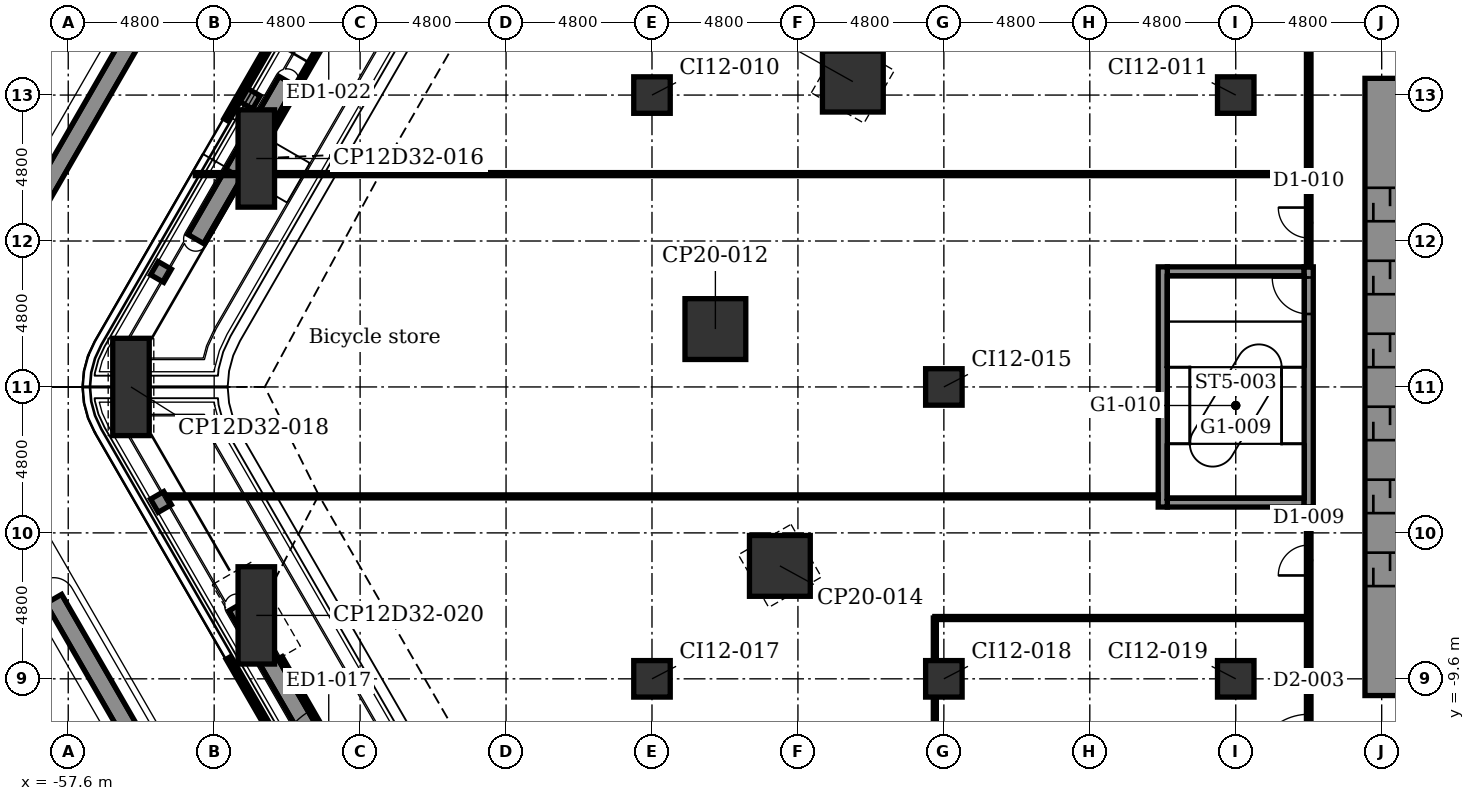
"""IFC4 building model, lengths in metres.
Left out: names, types, materials, properties, quantities, classifications, styles, units other than length and angle.
Written with IfcOpenShell. Run it as: python <this file> out.ifc"""

import sys

from ifc_helpers import new_model, si_unit, direction, frame, frame_2d, origin, origin_2d, place, context, subcontext, project, spatial, rectangle, extrude, element, fill, save


model = new_model("IFC4")
c1 = context("Model", 3, precision=1e-05, world=origin(), true_north=direction((0.0, 1.0)))
c2 = subcontext(c1, "Body", "Model", "MODEL_VIEW")
j1 = project(units=[si_unit("LENGTHUNIT", "METRE"), si_unit("PLANEANGLEUNIT", "RADIAN")], contexts=[c1])
p1 = place(None, origin())
s1 = spatial("IfcSite", under=j1, at=p1, CompositionType="ELEMENT")
p2 = place(p1, origin())
s2 = spatial("IfcBuilding", under=s1, at=p2, CompositionType="ELEMENT")
p3 = place(p2, origin())
s3 = spatial("IfcBuildingStorey", under=s2, at=p3, CompositionType="ELEMENT", Elevation=0.0)
for number, where, z_axis, x_axis in (
    (1, (-51.414, -7.514, -0.4), (0.0, 0.0, 1.0), (0.866, 0.5, 0.0)),
    (2, (-55.536, 0.0, -0.4), (0.0, 0.0, 1.0), (1.0, 0.0, 0.0)),
    (3, (-51.414, 7.514, -0.4), (0.0, 0.0, 1.0), (0.5, 0.866, 0.0)),
):
    element("IfcColumn", number, at=place(p3, frame(where, z_axis=z_axis, x_axis=x_axis)), inside=s3, PredefinedType="COLUMN", context=c2, shape_type="SweptSolid", body=[
        extrude(rectangle(XDim=1.2, YDim=3.2, at=origin_2d()), origin(), (0.0, 0.0, 1.0), 7.1),
    ])
for number, where, z_axis, x_axis in (
    (4, (-34.194, -5.885, -0.4), (0.0, 0.0, 1.0), (0.866, 0.5, 0.0)),
    (5, (-36.315, 1.904, -0.4), (0.0, 0.0, 1.0), (1.0, 0.0, 0.0)),
    (6, (-31.794, 10.042, -0.4), (0.0, 0.0, 1.0), (0.5, 0.866, 0.0)),
):
    element("IfcColumn", number, at=place(p3, frame(where, z_axis=z_axis, x_axis=x_axis)), inside=s3, PredefinedType="COLUMN", context=c2, shape_type="SweptSolid", body=[
        extrude(rectangle(XDim=2.0, YDim=2.0, at=origin_2d()), origin(), (0.0, 0.0, 1.0), 7.1),
    ])
for number, where, z_axis, x_axis in (
    (7, (-38.4, -9.6, -0.4), (0.0, 0.0, 1.0), (1.0, 0.0, 0.0)),
    (8, (-38.4, 9.6, -0.4), (0.0, 0.0, 1.0), (1.0, 0.0, 0.0)),
    (9, (-28.8, -9.6, -0.4), (0.0, 0.0, 1.0), (1.0, 0.0, 0.0)),
    (10, (-28.8, 0.0, -0.4), (0.0, 0.0, 1.0), (1.0, 0.0, 0.0)),
    (11, (-19.2, -9.6, -0.4), (0.0, 0.0, 1.0), (1.0, 0.0, 0.0)),
    (12, (-19.2, 9.6, -0.4), (0.0, 0.0, 1.0), (1.0, 0.0, 0.0)),
):
    element("IfcColumn", number, at=place(p3, frame(where, z_axis=z_axis, x_axis=x_axis)), inside=s3, PredefinedType="COLUMN", context=c2, shape_type="SweptSolid", body=[
        extrude(rectangle(XDim=1.2, YDim=1.2, at=origin_2d()), origin(), (0.0, 0.0, 1.0), 7.1),
    ])
for number, where, z_axis, x_axis in (
    (13, (-21.45, -3.8, -0.4), (0.0, 0.0, 1.0), (1.0, 0.0, 0.0)),
    (14, (-21.45, 3.8, -0.4), (0.0, 0.0, 1.0), (1.0, 0.0, 0.0)),
):
    element("IfcWall", number, at=place(p3, frame(where, z_axis=z_axis, x_axis=x_axis)), inside=s3, PredefinedType="STANDARD", context=c2, shape_type="SweptSolid", body=[
        extrude(rectangle(XDim=4.5, YDim=0.3, at=frame_2d((2.25, 0.0))), origin(), (0.0, 0.0, 1.0), 7.1),
    ])
p4 = place(p3, frame((-21.6, -3.95, -0.4), z_axis=(0.0, 0.0, 1.0), x_axis=(0.0, 1.0, 0.0)))
e15 = element("IfcWall", 15, at=p4, inside=s3, PredefinedType="STANDARD", context=c2, shape_type="SweptSolid", body=[
    extrude(rectangle(XDim=7.9, YDim=0.3, at=frame_2d((3.95, 0.0))), origin(), (0.0, 0.0, 1.0), 7.1),
])
p5 = place(p3, frame((-16.8, -3.95, -0.4), z_axis=(0.0, 0.0, 1.0), x_axis=(0.0, 1.0, 0.0)))
e16 = element("IfcWall", 16, at=p5, inside=s3, PredefinedType="STANDARD", context=c2, shape_type="SweptSolid", body=[
    extrude(rectangle(XDim=7.9, YDim=0.3, at=frame_2d((3.95, 0.0))), origin(), (0.0, 0.0, 1.0), 7.1),
])
p6 = place(p5, frame((6.35, 0.0, 0.4)))
e17 = element("IfcOpeningElement", 17, at=p6, cuts=e16, PredefinedType="OPENING", context=c2, shape_type="SweptSolid", body=[
    extrude(rectangle(XDim=1.2, YDim=2.1, at=frame_2d((0.6, 1.05))), frame((0.0, 0.16, 0.0), z_axis=(0.0, -1.0, 0.0), x_axis=(1.0, 0.0, 0.0)), (0.0, 0.0, 1.0), 0.32),
])
p7 = place(p3, frame((-14.4, -10.15, -0.4), z_axis=(0.0, 0.0, 1.0), x_axis=(0.0, 1.0, 0.0)))
e18 = element("IfcWall", 18, at=p7, inside=s3, PredefinedType="SHEAR", context=c2, shape_type="SweptSolid", body=[
    extrude(rectangle(XDim=20.3, YDim=1.1, at=frame_2d((10.15, 0.0))), origin(), (0.0, 0.0, 1.0), 7.1),
])
p8 = place(p7, frame((3.6, 0.0, 0.4)))
e19 = element("IfcOpeningElement", 19, at=p8, cuts=e18, PredefinedType="OPENING", context=c2, shape_type="SweptSolid", body=[
    extrude(rectangle(XDim=1.1, YDim=2.1, at=frame_2d((0.55, 1.05))), frame((0.0, 0.56, 0.0), z_axis=(0.0, -1.0, 0.0), x_axis=(1.0, 0.0, 0.0)), (0.0, 0.0, 1.0), 1.12),
])
p9 = place(p7, frame((6.0, 0.0, 0.4)))
e20 = element("IfcOpeningElement", 20, at=p9, cuts=e18, PredefinedType="OPENING", context=c2, shape_type="SweptSolid", body=[
    extrude(rectangle(XDim=1.1, YDim=2.1, at=frame_2d((0.55, 1.05))), frame((0.0, 0.56, 0.0), z_axis=(0.0, -1.0, 0.0), x_axis=(1.0, 0.0, 0.0)), (0.0, 0.0, 1.0), 1.12),
])
p10 = place(p7, frame((8.4, 0.0, 0.4)))
e21 = element("IfcOpeningElement", 21, at=p10, cuts=e18, PredefinedType="OPENING", context=c2, shape_type="SweptSolid", body=[
    extrude(rectangle(XDim=1.1, YDim=2.1, at=frame_2d((0.55, 1.05))), frame((0.0, 0.56, 0.0), z_axis=(0.0, -1.0, 0.0), x_axis=(1.0, 0.0, 0.0)), (0.0, 0.0, 1.0), 1.12),
])
p11 = place(p7, frame((10.8, 0.0, 0.4)))
e22 = element("IfcOpeningElement", 22, at=p11, cuts=e18, PredefinedType="OPENING", context=c2, shape_type="SweptSolid", body=[
    extrude(rectangle(XDim=1.1, YDim=2.1, at=frame_2d((0.55, 1.05))), frame((0.0, 0.56, 0.0), z_axis=(0.0, -1.0, 0.0), x_axis=(1.0, 0.0, 0.0)), (0.0, 0.0, 1.0), 1.12),
])
p12 = place(p7, frame((13.2, 0.0, 0.4)))
e23 = element("IfcOpeningElement", 23, at=p12, cuts=e18, PredefinedType="OPENING", context=c2, shape_type="SweptSolid", body=[
    extrude(rectangle(XDim=1.1, YDim=2.1, at=frame_2d((0.55, 1.05))), frame((0.0, 0.56, 0.0), z_axis=(0.0, -1.0, 0.0), x_axis=(1.0, 0.0, 0.0)), (0.0, 0.0, 1.0), 1.12),
])
p13 = place(p7, frame((15.6, 0.0, 0.4)))
e24 = element("IfcOpeningElement", 24, at=p13, cuts=e18, PredefinedType="OPENING", context=c2, shape_type="SweptSolid", body=[
    extrude(rectangle(XDim=1.1, YDim=2.1, at=frame_2d((0.55, 1.05))), frame((0.0, 0.56, 0.0), z_axis=(0.0, -1.0, 0.0), x_axis=(1.0, 0.0, 0.0)), (0.0, 0.0, 1.0), 1.12),
])
p14 = place(p3, frame((-47.433, -14.45, 0.0), z_axis=(0.0, 0.0, 1.0), x_axis=(-0.500002207027, 0.866024129553, 0.0)))
e25 = element("IfcWall", 25, at=p14, inside=s3, PredefinedType="PARTITIONING", context=c2, shape_type="SweptSolid", body=[
    extrude(rectangle(XDim=6.396, YDim=0.16, at=frame_2d((3.198, 0.0))), origin(), (0.0, 0.0, 1.0), 6.7),
])
p15 = place(p14, frame((1.998, 0.0, 0.0)))
e26 = element("IfcOpeningElement", 26, at=p15, cuts=e25, PredefinedType="OPENING", context=c2, shape_type="SweptSolid", body=[
    extrude(rectangle(XDim=2.4, YDim=2.4, at=frame_2d((1.2, 1.2))), frame((0.0, 0.09, 0.0), z_axis=(0.0, -1.0, 0.0), x_axis=(1.0, 0.0, 0.0)), (0.0, 0.0, 1.0), 0.18),
])
p16 = place(p3, frame((-51.131, 8.045, 0.0), z_axis=(0.0, 0.0, 1.0), x_axis=(0.49999513524, 0.866028212437, 0.0)))
e27 = element("IfcWall", 27, at=p16, inside=s3, PredefinedType="PARTITIONING", context=c2, shape_type="SweptSolid", body=[
    extrude(rectangle(XDim=8.396, YDim=0.16, at=frame_2d((4.198, 0.0))), origin(), (0.0, 0.0, 1.0), 6.7),
])
p17 = place(p16, frame((2.998, 0.0, 0.0)))
e28 = element("IfcOpeningElement", 28, at=p17, cuts=e27, PredefinedType="OPENING", context=c2, shape_type="SweptSolid", body=[
    extrude(rectangle(XDim=2.4, YDim=2.4, at=frame_2d((1.2, 1.2))), frame((0.0, 0.09, 0.0), z_axis=(0.0, -1.0, 0.0), x_axis=(1.0, 0.0, 0.0)), (0.0, 0.0, 1.0), 0.18),
])
p18 = place(p3, frame((-48.289, -15.927, 0.0), z_axis=(0.0, 0.0, 1.0), x_axis=(-0.500001755459, 0.866024390267, 0.0)))
e29 = element("IfcWall", 29, at=p18, inside=s3, PredefinedType="PARTITIONING", context=c2, shape_type="SweptSolid", body=[
    extrude(rectangle(XDim=8.096, YDim=0.16, at=frame_2d((4.048, 0.0))), origin(), (0.0, 0.0, 1.0), 6.7),
])
p19 = place(p18, frame((2.848, 0.0, 0.0)))
e30 = element("IfcOpeningElement", 30, at=p19, cuts=e29, PredefinedType="OPENING", context=c2, shape_type="SweptSolid", body=[
    extrude(rectangle(XDim=2.4, YDim=2.4, at=frame_2d((1.2, 1.2))), frame((0.0, 0.09, 0.0), z_axis=(0.0, -1.0, 0.0), x_axis=(1.0, 0.0, 0.0)), (0.0, 0.0, 1.0), 0.18),
])
p20 = place(p3, frame((-52.411, 8.787, 0.0), z_axis=(0.0, 0.0, 1.0), x_axis=(0.499996941814, 0.866027169422, 0.0)))
e31 = element("IfcWall", 31, at=p20, inside=s3, PredefinedType="PARTITIONING", context=c2, shape_type="SweptSolid", body=[
    extrude(rectangle(XDim=8.392, YDim=0.16, at=frame_2d((4.196, 0.0))), origin(), (0.0, 0.0, 1.0), 6.7),
])
p21 = place(p20, frame((2.996, 0.0, 0.0)))
e32 = element("IfcOpeningElement", 32, at=p21, cuts=e31, PredefinedType="OPENING", context=c2, shape_type="SweptSolid", body=[
    extrude(rectangle(XDim=2.4, YDim=2.4, at=frame_2d((1.2, 1.2))), frame((0.0, 0.09, 0.0), z_axis=(0.0, -1.0, 0.0), x_axis=(1.0, 0.0, 0.0)), (0.0, 0.0, 1.0), 0.18),
])
for number, where, z_axis, x_axis in (
    (33, (-49.052, -12.406, 7.0), (0.0, 0.0, 1.0), (-0.5, 0.866, 0.0)),
    (34, (-53.405, 4.865, 7.0), (0.0, 0.0, 1.0), (0.5, 0.866, 0.0)),
):
    element("IfcWall", number, at=place(p3, frame(where, z_axis=z_axis, x_axis=x_axis)), inside=s3, PredefinedType="USERDEFINED", context=c2, shape_type="SweptSolid", body=[
        extrude(rectangle(XDim=6.0, YDim=0.6, at=frame_2d((3.0, 0.0))), origin(), (0.0, 0.0, 1.0), 0.7),
    ])
for number, where, z_axis, x_axis in (
    (35, (-52.077, -17.365, 0.0), (0.0, 0.0, 1.0), (-0.5, 0.866, 0.0)),
    (36, (-60.577, 2.643, 0.0), (0.0, 0.0, 1.0), (0.5, 0.866, 0.0)),
):
    element("IfcWall", number, at=place(p3, frame(where, z_axis=z_axis, x_axis=x_axis)), inside=s3, PredefinedType="USERDEFINED", context=c2, shape_type="SweptSolid", body=[
        extrude(rectangle(XDim=12.0, YDim=0.6, at=frame_2d((6.0, 0.0))), origin(), (0.0, 0.0, 1.0), 0.7),
    ])
for number, where, z_axis, x_axis in (
    (37, (-54.425, -3.999, 0.0), (0.0, 0.0, 1.0), (-0.5, 0.866, 0.0)),
    (38, (-54.675, 3.565, 0.0), (0.0, 0.0, 1.0), (0.5, 0.866, 0.0)),
):
    element("IfcWall", number, at=place(p3, frame(where, z_axis=z_axis, x_axis=x_axis)), inside=s3, PredefinedType="SOLIDWALL", context=c2, shape_type="SweptSolid", body=[
        extrude(rectangle(XDim=0.5, YDim=0.5, at=frame_2d((0.25, 0.0))), origin(), (0.0, 0.0, 1.0), 6.4),
    ])
p22 = place(p3, frame((-51.753, 9.268, 0.0), z_axis=(0.0, 0.0, 1.0), x_axis=(0.500131122175, 0.865949687125, 0.0)))
e39 = element("IfcWall", 39, at=p22, inside=s3, PredefinedType="SOLIDWALL", context=c2, shape_type="SweptSolid", body=[
    extrude(rectangle(XDim=0.5, YDim=0.5, at=frame_2d((0.25, 0.0))), origin(), (0.0, 0.0, 1.0), 6.4),
])
p23 = place(p3, frame((-16.8, -14.8, 0.0), z_axis=(0.0, 0.0, 1.0), x_axis=(0.0, 1.0, 0.0)))
e40 = element("IfcWall", 40, at=p23, inside=s3, PredefinedType="PARTITIONING", context=c2, shape_type="SweptSolid", body=[
    extrude(rectangle(XDim=10.85, YDim=0.15, at=frame_2d((5.425, 0.0))), origin(), (0.0, 0.0, 1.0), 6.7),
])
p24 = place(p23, frame((2.235, 0.0, 0.0)))
e41 = element("IfcOpeningElement", 41, at=p24, cuts=e40, PredefinedType="OPENING", context=c2, shape_type="SweptSolid", body=[
    extrude(rectangle(XDim=1.8, YDim=2.1, at=frame_2d((0.9, 1.05))), frame((0.0, 0.085, 0.0), z_axis=(0.0, -1.0, 0.0), x_axis=(1.0, 0.0, 0.0)), (0.0, 0.0, 1.0), 0.17),
])
p25 = place(p23, frame((8.6, 0.0, 0.0)))
e42 = element("IfcOpeningElement", 42, at=p25, cuts=e40, PredefinedType="OPENING", context=c2, shape_type="SweptSolid", body=[
    extrude(rectangle(XDim=1.0, YDim=2.1, at=frame_2d((0.5, 1.05))), frame((0.0, 0.085, 0.0), z_axis=(0.0, -1.0, 0.0), x_axis=(1.0, 0.0, 0.0)), (0.0, 0.0, 1.0), 0.17),
])
p26 = place(p3, frame((-16.8, 3.95, 0.0), z_axis=(0.0, 0.0, 1.0), x_axis=(0.0, 1.0, 0.0)))
e43 = element("IfcWall", 43, at=p26, inside=s3, PredefinedType="PARTITIONING", context=c2, shape_type="SweptSolid", body=[
    extrude(rectangle(XDim=12.05, YDim=0.15, at=frame_2d((6.025, 0.0))), origin(), (0.0, 0.0, 1.0), 6.7),
])
p27 = place(p26, frame((0.95, 0.0, 0.0)))
e44 = element("IfcOpeningElement", 44, at=p27, cuts=e43, PredefinedType="OPENING", context=c2, shape_type="SweptSolid", body=[
    extrude(rectangle(XDim=1.0, YDim=2.1, at=frame_2d((0.5, 1.05))), frame((0.0, 0.085, 0.0), z_axis=(0.0, -1.0, 0.0), x_axis=(1.0, 0.0, 0.0)), (0.0, 0.0, 1.0), 0.17),
])
p28 = place(p26, frame((8.645, 0.0, 0.0)))
e45 = element("IfcOpeningElement", 45, at=p28, cuts=e43, PredefinedType="OPENING", context=c2, shape_type="SweptSolid", body=[
    extrude(rectangle(XDim=1.8, YDim=2.1, at=frame_2d((0.9, 1.05))), frame((0.0, 0.085, 0.0), z_axis=(0.0, -1.0, 0.0), x_axis=(1.0, 0.0, 0.0)), (0.0, 0.0, 1.0), 0.17),
])
p29 = place(p3, frame((-29.097, -48.911, 0.0), z_axis=(0.0, 0.0, 1.0), x_axis=(0.0, 1.0, 0.0)))
e46 = element("IfcWall", 46, at=p29, inside=s3, PredefinedType="PARTITIONING", context=c2, shape_type="SweptSolid", body=[
    extrude(rectangle(XDim=41.311, YDim=0.1, at=frame_2d((20.655, 0.0))), origin(), (0.0, 0.0, 1.0), 6.7),
])
p30 = place(p3, frame((-29.097, -7.6, 0.0), z_axis=(0.0, 0.0, 1.0), x_axis=(1.0, 0.0, 0.0)))
e47 = element("IfcWall", 47, at=p30, inside=s3, PredefinedType="PARTITIONING", context=c2, shape_type="SweptSolid", body=[
    extrude(rectangle(XDim=12.297, YDim=0.1, at=frame_2d((6.148, 0.0))), origin(), (0.0, 0.0, 1.0), 6.7),
])
p31 = place(p3, frame((-54.338, -3.6, 0.0), z_axis=(0.0, 0.0, 1.0), x_axis=(1.0, 0.0, 0.0)))
e48 = element("IfcWall", 48, at=p31, inside=s3, PredefinedType="PARTITIONING", context=c2, shape_type="SweptSolid", body=[
    extrude(rectangle(XDim=32.588, YDim=0.1, at=frame_2d((16.294, 0.0))), origin(), (0.0, 0.0, 1.0), 6.7),
])
p32 = place(p3, frame((-53.42, 7.0, 0.0), z_axis=(0.0, 0.0, 1.0), x_axis=(1.0, 0.0, 0.0)))
e49 = element("IfcWall", 49, at=p32, inside=s3, PredefinedType="PARTITIONING", context=c2, shape_type="SweptSolid", body=[
    extrude(rectangle(XDim=36.62, YDim=0.1, at=frame_2d((18.31, 0.0))), origin(), (0.0, 0.0, 1.0), 6.7),
])
p33 = place(p15, origin())
e50 = element("IfcDoor", 50, at=p33, inside=s3, OperationType="DOUBLE_DOOR_DOUBLE_SWING", PredefinedType="DOOR", context=c2, shape_type="SweptSolid", body=[
    extrude(rectangle(XDim=2.4, YDim=2.4, at=frame_2d((1.2, 1.2))), frame((0.0, 0.025, 0.0), z_axis=(0.0, -1.0, 0.0), x_axis=(1.0, 0.0, 0.0)), (0.0, 0.0, 1.0), 0.05),
])
fill(e26, e50)
p34 = place(p17, origin())
e51 = element("IfcDoor", 51, at=p34, inside=s3, OperationType="DOUBLE_DOOR_DOUBLE_SWING", PredefinedType="DOOR", context=c2, shape_type="SweptSolid", body=[
    extrude(rectangle(XDim=2.4, YDim=2.4, at=frame_2d((1.2, 1.2))), frame((0.0, 0.025, 0.0), z_axis=(0.0, -1.0, 0.0), x_axis=(1.0, 0.0, 0.0)), (0.0, 0.0, 1.0), 0.05),
])
fill(e28, e51)
p35 = place(p24, origin())
e52 = element("IfcDoor", 52, at=p35, inside=s3, OperationType="SINGLE_SWING_LEFT", PredefinedType="DOOR", context=c2, shape_type="SweptSolid", body=[
    extrude(rectangle(XDim=1.8, YDim=2.1, at=frame_2d((0.9, 1.05))), frame((0.0, 0.025, 0.0), z_axis=(0.0, -1.0, 0.0), x_axis=(1.0, 0.0, 0.0)), (0.0, 0.0, 1.0), 0.05),
])
fill(e41, e52)
p36 = place(p25, origin())
e53 = element("IfcDoor", 53, at=p36, inside=s3, OperationType="SINGLE_SWING_LEFT", PredefinedType="DOOR", context=c2, shape_type="SweptSolid", body=[
    extrude(rectangle(XDim=1.0, YDim=2.1, at=frame_2d((0.5, 1.05))), frame((0.0, 0.025, 0.0), z_axis=(0.0, -1.0, 0.0), x_axis=(1.0, 0.0, 0.0)), (0.0, 0.0, 1.0), 0.05),
])
fill(e42, e53)
p37 = place(p27, origin())
e54 = element("IfcDoor", 54, at=p37, inside=s3, OperationType="SINGLE_SWING_RIGHT", PredefinedType="DOOR", context=c2, shape_type="SweptSolid", body=[
    extrude(rectangle(XDim=1.0, YDim=2.1, at=frame_2d((0.5, 1.05))), frame((0.0, 0.025, 0.0), z_axis=(0.0, -1.0, 0.0), x_axis=(1.0, 0.0, 0.0)), (0.0, 0.0, 1.0), 0.05),
])
fill(e44, e54)
p38 = place(p8, origin())
e55 = element("IfcDoor", 55, at=p38, inside=s3, OperationType="DOUBLE_DOOR_SLIDING", PredefinedType="DOOR", context=c2, shape_type="SweptSolid", body=[
    extrude(rectangle(XDim=1.1, YDim=2.1, at=frame_2d((0.55, 1.05))), frame((0.0, 0.025, 0.0), z_axis=(0.0, -1.0, 0.0), x_axis=(1.0, 0.0, 0.0)), (0.0, 0.0, 1.0), 0.05),
])
fill(e19, e55)
p39 = place(p9, origin())
e56 = element("IfcDoor", 56, at=p39, inside=s3, OperationType="DOUBLE_DOOR_SLIDING", PredefinedType="DOOR", context=c2, shape_type="SweptSolid", body=[
    extrude(rectangle(XDim=1.1, YDim=2.1, at=frame_2d((0.55, 1.05))), frame((0.0, 0.025, 0.0), z_axis=(0.0, -1.0, 0.0), x_axis=(1.0, 0.0, 0.0)), (0.0, 0.0, 1.0), 0.05),
])
fill(e20, e56)
p40 = place(p10, origin())
e57 = element("IfcDoor", 57, at=p40, inside=s3, OperationType="DOUBLE_DOOR_SLIDING", PredefinedType="DOOR", context=c2, shape_type="SweptSolid", body=[
    extrude(rectangle(XDim=1.1, YDim=2.1, at=frame_2d((0.55, 1.05))), frame((0.0, 0.025, 0.0), z_axis=(0.0, -1.0, 0.0), x_axis=(1.0, 0.0, 0.0)), (0.0, 0.0, 1.0), 0.05),
])
fill(e21, e57)
p41 = place(p11, origin())
e58 = element("IfcDoor", 58, at=p41, inside=s3, OperationType="DOUBLE_DOOR_SLIDING", PredefinedType="DOOR", context=c2, shape_type="SweptSolid", body=[
    extrude(rectangle(XDim=1.1, YDim=2.1, at=frame_2d((0.55, 1.05))), frame((0.0, 0.025, 0.0), z_axis=(0.0, -1.0, 0.0), x_axis=(1.0, 0.0, 0.0)), (0.0, 0.0, 1.0), 0.05),
])
fill(e22, e58)
p42 = place(p12, origin())
e59 = element("IfcDoor", 59, at=p42, inside=s3, OperationType="DOUBLE_DOOR_SLIDING", PredefinedType="DOOR", context=c2, shape_type="SweptSolid", body=[
    extrude(rectangle(XDim=1.1, YDim=2.1, at=frame_2d((0.55, 1.05))), frame((0.0, 0.025, 0.0), z_axis=(0.0, -1.0, 0.0), x_axis=(1.0, 0.0, 0.0)), (0.0, 0.0, 1.0), 0.05),
])
fill(e23, e59)
p43 = place(p13, origin())
e60 = element("IfcDoor", 60, at=p43, inside=s3, OperationType="DOUBLE_DOOR_SLIDING", PredefinedType="DOOR", context=c2, shape_type="SweptSolid", body=[
    extrude(rectangle(XDim=1.1, YDim=2.1, at=frame_2d((0.55, 1.05))), frame((0.0, 0.025, 0.0), z_axis=(0.0, -1.0, 0.0), x_axis=(1.0, 0.0, 0.0)), (0.0, 0.0, 1.0), 0.05),
])
fill(e24, e60)
p44 = place(p6, origin())
e61 = element("IfcDoor", 61, at=p44, inside=s3, OperationType="SINGLE_SWING_RIGHT", PredefinedType="DOOR", context=c2, shape_type="SweptSolid", body=[
    extrude(rectangle(XDim=1.2, YDim=2.1, at=frame_2d((0.6, 1.05))), frame((0.0, 0.025, 0.0), z_axis=(0.0, -1.0, 0.0), x_axis=(1.0, 0.0, 0.0)), (0.0, 0.0, 1.0), 0.05),
])
fill(e17, e61)
save(model, sys.argv[1])
